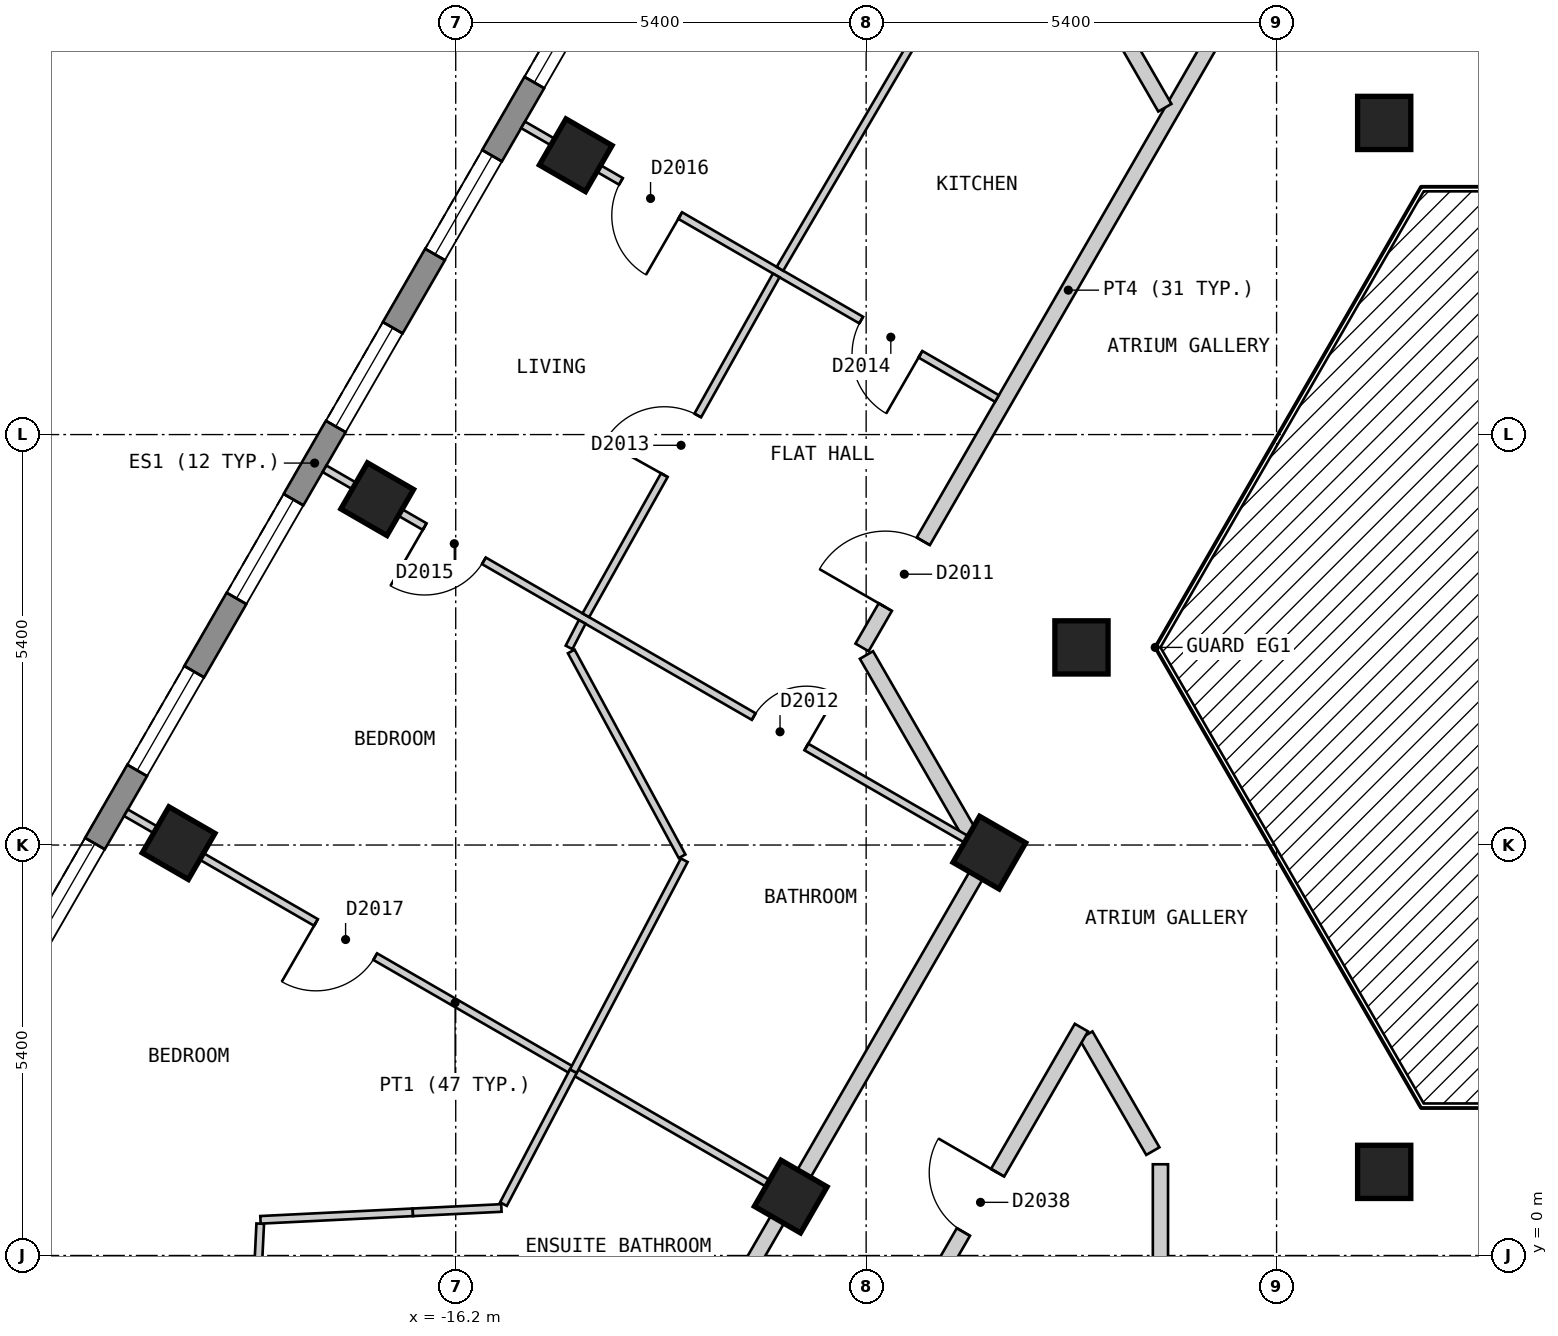
"""IFC4 building model, lengths in metres.
Left out: names, types, materials, properties, quantities, classifications, styles, units other than length and angle.
Written with IfcOpenShell. Run it as: python <this file> out.ifc"""

import sys

from ifc_helpers import new_model, si_unit, direction, frame, frame_2d, origin, origin_2d, place, context, subcontext, project, spatial, polyline, rectangle, outline, extrude, element, fill, save


model = new_model("IFC4")
c1 = context("Model", 3, precision=1e-05, world=origin(), true_north=direction((0.0, 1.0)))
c2 = subcontext(c1, "Body", "Model", "MODEL_VIEW")
j1 = project(units=[si_unit("LENGTHUNIT", "METRE"), si_unit("PLANEANGLEUNIT", "RADIAN")], contexts=[c1])
p1 = place(None, origin())
s1 = spatial("IfcSite", under=j1, at=p1, CompositionType="ELEMENT")
p2 = place(p1, origin())
s2 = spatial("IfcBuilding", under=s1, at=p2, CompositionType="ELEMENT")
p3 = place(p2, frame((0.0, 0.0, 238.8)))
s3 = spatial("IfcBuildingStorey", under=s2, at=p3, CompositionType="ELEMENT", Elevation=238.8)
for number, where, z_axis, x_axis in (
    (1, (-14.621, 14.475, 0.0), (0.0, 0.0, 1.0), (-0.5, -0.866, 0.0)),
    (2, (-17.233, 9.95, 0.0), (0.0, 0.0, 1.0), (-0.5, -0.866, 0.0)),
    (3, (-19.846, 5.425, 0.0), (0.0, 0.0, 1.0), (-0.5, -0.866, 0.0)),
    (4, (-3.984, 14.9, 0.0), (0.0, 0.0, 1.0), (1.0, 0.0, 0.0)),
    (5, (-7.967, 8.0, 0.0), (0.0, 0.0, 1.0), (1.0, 0.0, 0.0)),
    (6, (-9.179, 5.3, 0.0), (0.0, 0.0, 1.0), (-0.5, -0.866, 0.0)),
    (7, (-3.984, 1.1, 0.0), (0.0, 0.0, 1.0), (1.0, 0.0, 0.0)),
    (8, (-11.792, 0.775, 0.0), (0.0, 0.0, 1.0), (-0.5, -0.866, 0.0)),
):
    element("IfcColumn", number, at=place(p3, frame(where, z_axis=z_axis, x_axis=x_axis)), inside=s3, PredefinedType="COLUMN", context=c2, shape_type="SweptSolid", body=[
        extrude(rectangle(XDim=0.7, YDim=0.7, at=origin_2d()), origin(), (0.0, 0.0, 1.0), 3.0),
    ])
p4 = place(p3, frame((-12.514, 20.025, 0.0), z_axis=(0.0, 0.0, 1.0), x_axis=(-0.500003656944, -0.866023292436, 0.0)))
e9 = element("IfcWall", 9, at=p4, inside=s3, PredefinedType="SOLIDWALL", context=c2, shape_type="SweptSolid", body=[
    extrude(outline(polyline([(0.0, -0.15), (22.17, -0.15), (22.09, 0.15), (0.08, 0.15), (0.0, -0.15)])), origin(), (0.0, 0.0, 1.0), 2.7),
])
p5 = place(p4, frame((1.191, 0.0, 0.15)))
e10 = element("IfcOpeningElement", 10, at=p5, cuts=e9, PredefinedType="OPENING", context=c2, shape_type="SweptSolid", body=[
    extrude(rectangle(XDim=1.5, YDim=2.1, at=frame_2d((0.75, 1.05))), frame((0.0, 0.16, 0.0), z_axis=(0.0, -1.0, 0.0), x_axis=(1.0, 0.0, 0.0)), (0.0, 0.0, 1.0), 0.32),
])
p6 = place(p4, frame((3.804, 0.0, 0.15)))
e11 = element("IfcOpeningElement", 11, at=p6, cuts=e9, PredefinedType="OPENING", context=c2, shape_type="SweptSolid", body=[
    extrude(rectangle(XDim=1.5, YDim=2.1, at=frame_2d((0.75, 1.05))), frame((0.0, 0.16, 0.0), z_axis=(0.0, -1.0, 0.0), x_axis=(1.0, 0.0, 0.0)), (0.0, 0.0, 1.0), 0.32),
])
p7 = place(p4, frame((6.416, 0.0, 0.15)))
e12 = element("IfcOpeningElement", 12, at=p7, cuts=e9, PredefinedType="OPENING", context=c2, shape_type="SweptSolid", body=[
    extrude(rectangle(XDim=1.5, YDim=2.1, at=frame_2d((0.75, 1.05))), frame((0.0, 0.16, 0.0), z_axis=(0.0, -1.0, 0.0), x_axis=(1.0, 0.0, 0.0)), (0.0, 0.0, 1.0), 0.32),
])
p8 = place(p4, frame((9.029, 0.0, 0.15)))
e13 = element("IfcOpeningElement", 13, at=p8, cuts=e9, PredefinedType="OPENING", context=c2, shape_type="SweptSolid", body=[
    extrude(rectangle(XDim=1.5, YDim=2.1, at=frame_2d((0.75, 1.05))), frame((0.0, 0.16, 0.0), z_axis=(0.0, -1.0, 0.0), x_axis=(1.0, 0.0, 0.0)), (0.0, 0.0, 1.0), 0.32),
])
p9 = place(p4, frame((11.641, 0.0, 0.15)))
e14 = element("IfcOpeningElement", 14, at=p9, cuts=e9, PredefinedType="OPENING", context=c2, shape_type="SweptSolid", body=[
    extrude(rectangle(XDim=1.5, YDim=2.1, at=frame_2d((0.75, 1.05))), frame((0.0, 0.16, 0.0), z_axis=(0.0, -1.0, 0.0), x_axis=(1.0, 0.0, 0.0)), (0.0, 0.0, 1.0), 0.32),
])
p10 = place(p4, frame((14.254, 0.0, 0.15)))
e15 = element("IfcOpeningElement", 15, at=p10, cuts=e9, PredefinedType="OPENING", context=c2, shape_type="SweptSolid", body=[
    extrude(rectangle(XDim=1.5, YDim=2.1, at=frame_2d((0.75, 1.05))), frame((0.0, 0.16, 0.0), z_axis=(0.0, -1.0, 0.0), x_axis=(1.0, 0.0, 0.0)), (0.0, 0.0, 1.0), 0.32),
])
p11 = place(p4, frame((16.866, 0.0, 0.15)))
e16 = element("IfcOpeningElement", 16, at=p11, cuts=e9, PredefinedType="OPENING", context=c2, shape_type="SweptSolid", body=[
    extrude(rectangle(XDim=1.5, YDim=2.1, at=frame_2d((0.75, 1.05))), frame((0.0, 0.16, 0.0), z_axis=(0.0, -1.0, 0.0), x_axis=(1.0, 0.0, 0.0)), (0.0, 0.0, 1.0), 0.32),
])
p12 = place(p4, frame((19.479, 0.0, 0.15)))
e17 = element("IfcOpeningElement", 17, at=p12, cuts=e9, PredefinedType="OPENING", context=c2, shape_type="SweptSolid", body=[
    extrude(rectangle(XDim=1.5, YDim=2.1, at=frame_2d((0.75, 1.05))), frame((0.0, 0.16, 0.0), z_axis=(0.0, -1.0, 0.0), x_axis=(1.0, 0.0, 0.0)), (0.0, 0.0, 1.0), 0.32),
])
p13 = place(p3, frame((-10.796, 7.9, 0.0), z_axis=(0.0, 0.0, 1.0), x_axis=(0.499797758538, -0.866142136465, 0.0)))
e18 = element("IfcWall", 18, at=p13, inside=s3, PredefinedType="PARTITIONING", context=c2, shape_type="SweptSolid", body=[
    extrude(rectangle(XDim=2.713, YDim=0.2, at=frame_2d((1.356, 0.0))), origin(), (0.0, 0.0, 1.0), 2.7),
])
p14 = place(p3, frame((-7.909, 2.898, 0.0), z_axis=(0.0, 0.0, 1.0), x_axis=(0.50019444547, -0.865913111531, 0.0)))
e19 = element("IfcWall", 19, at=p14, inside=s3, PredefinedType="PARTITIONING", context=c2, shape_type="SweptSolid", body=[
    extrude(rectangle(XDim=1.761, YDim=0.2, at=frame_2d((0.88, 0.0))), origin(), (0.0, 0.0, 1.0), 2.7),
])
p15 = place(p3, frame((-10.623, -1.6, 0.0), z_axis=(0.0, 0.0, 1.0), x_axis=(0.500040865889, 0.866001808567, 0.0)))
e20 = element("IfcWall", 20, at=p15, inside=s3, PredefinedType="PARTITIONING", context=c2, shape_type="SweptSolid", body=[
    extrude(rectangle(XDim=5.31, YDim=0.2, at=frame_2d((2.655, 0.0))), origin(), (0.0, 0.0, 1.0), 2.7),
])
p16 = place(p15, frame((2.205, 0.0, 0.0)))
e21 = element("IfcOpeningElement", 21, at=p16, cuts=e20, PredefinedType="OPENING", context=c2, shape_type="SweptSolid", body=[
    extrude(rectangle(XDim=0.9, YDim=2.1, at=frame_2d((0.45, 1.05))), frame((0.0, 0.11, 0.0), z_axis=(0.0, -1.0, 0.0), x_axis=(1.0, 0.0, 0.0)), (0.0, 0.0, 1.0), 0.22),
])
p17 = place(p3, frame((-13.106, -1.5, 0.0), z_axis=(0.0, 0.0, 1.0), x_axis=(0.500025705601, 0.86601056214, 0.0)))
e22 = element("IfcWall", 22, at=p17, inside=s3, PredefinedType="PARTITIONING", context=c2, shape_type="SweptSolid", body=[
    extrude(rectangle(XDim=7.735, YDim=0.2, at=frame_2d((3.868, 0.0))), origin(), (0.0, 0.0, 1.0), 2.7),
])
p18 = place(p3, frame((-10.854, 8.0, 0.0), z_axis=(0.0, 0.0, 1.0), x_axis=(0.499997637144, 0.866026767976, 0.0)))
e23 = element("IfcWall", 23, at=p18, inside=s3, PredefinedType="PARTITIONING", context=c2, shape_type="SweptSolid", body=[
    extrude(rectangle(XDim=10.854, YDim=0.2, at=frame_2d((5.427, 0.0))), origin(), (0.0, 0.0, 1.0), 2.7),
])
p19 = place(p18, frame((0.612, 0.0, 0.0)))
e24 = element("IfcOpeningElement", 24, at=p19, cuts=e23, PredefinedType="OPENING", context=c2, shape_type="SweptSolid", body=[
    extrude(rectangle(XDim=1.0, YDim=2.1, at=frame_2d((0.5, 1.05))), frame((0.0, 0.11, 0.0), z_axis=(0.0, -1.0, 0.0), x_axis=(1.0, 0.0, 0.0)), (0.0, 0.0, 1.0), 0.22),
])
p20 = place(p3, frame((-6.928, -2.799, 0.0), z_axis=(0.0, 0.0, 1.0), x_axis=(0.0, 1.0, 0.0)))
e25 = element("IfcWall", 25, at=p20, inside=s3, PredefinedType="PARTITIONING", context=c2, shape_type="SweptSolid", body=[
    extrude(rectangle(XDim=3.999, YDim=0.2, at=frame_2d((2.0, 0.0))), origin(), (0.0, 0.0, 1.0), 2.7),
])
p21 = place(p3, frame((-14.68, 7.947, 0.0), z_axis=(0.0, 0.0, 1.0), x_axis=(0.475823637798, -0.879540712936, 0.0)))
e26 = element("IfcWall", 26, at=p21, inside=s3, PredefinedType="PARTITIONING", context=c2, shape_type="SweptSolid", body=[
    extrude(rectangle(XDim=3.064, YDim=0.1, at=frame_2d((1.532, 0.0))), origin(), (0.0, 0.0, 1.0), 2.7),
])
p22 = place(p3, frame((-20.539, 5.825, 0.0), z_axis=(0.0, 0.0, 1.0), x_axis=(0.866047370643, -0.499961950354, 0.0)))
e27 = element("IfcWall", 27, at=p22, inside=s3, PredefinedType="PARTITIONING", context=c2, shape_type="SweptSolid", body=[
    extrude(rectangle(XDim=10.001, YDim=0.1, at=frame_2d((5.0, 0.0))), origin(), (0.0, 0.0, 1.0), 2.7),
])
p23 = place(p22, frame((2.887, 0.0, 0.0)))
e28 = element("IfcOpeningElement", 28, at=p23, cuts=e27, PredefinedType="OPENING", context=c2, shape_type="SweptSolid", body=[
    extrude(rectangle(XDim=0.9, YDim=2.1, at=frame_2d((0.45, 1.05))), frame((0.0, 0.06, 0.0), z_axis=(0.0, -1.0, 0.0), x_axis=(1.0, 0.0, 0.0)), (0.0, 0.0, 1.0), 0.12),
])
p24 = place(p3, frame((-17.926, 10.35, 0.0), z_axis=(0.0, 0.0, 1.0), x_axis=(0.866018411306, -0.500012111133, 0.0)))
e29 = element("IfcWall", 29, at=p24, inside=s3, PredefinedType="PARTITIONING", context=c2, shape_type="SweptSolid", body=[
    extrude(rectangle(XDim=9.898, YDim=0.1, at=frame_2d((4.949, 0.0))), origin(), (0.0, 0.0, 1.0), 2.7),
])
p25 = place(p24, frame((6.52, 0.0, 0.0)))
e30 = element("IfcOpeningElement", 30, at=p25, cuts=e29, PredefinedType="OPENING", context=c2, shape_type="SweptSolid", body=[
    extrude(rectangle(XDim=0.8, YDim=2.1, at=frame_2d((0.4, 1.05))), frame((0.0, 0.06, 0.0), z_axis=(0.0, -1.0, 0.0), x_axis=(1.0, 0.0, 0.0)), (0.0, 0.0, 1.0), 0.12),
])
p26 = place(p24, frame((1.521, 0.0, 0.0)))
e31 = element("IfcOpeningElement", 31, at=p26, cuts=e29, PredefinedType="OPENING", context=c2, shape_type="SweptSolid", body=[
    extrude(rectangle(XDim=0.9, YDim=2.1, at=frame_2d((0.45, 1.05))), frame((0.0, 0.06, 0.0), z_axis=(0.0, -1.0, 0.0), x_axis=(1.0, 0.0, 0.0)), (0.0, 0.0, 1.0), 0.12),
])
p27 = place(p3, frame((-15.314, 14.875, 0.0), z_axis=(0.0, 0.0, 1.0), x_axis=(0.866001485781, -0.500041424909, 0.0)))
e32 = element("IfcWall", 32, at=p27, inside=s3, PredefinedType="PARTITIONING", context=c2, shape_type="SweptSolid", body=[
    extrude(rectangle(XDim=7.2, YDim=0.1, at=frame_2d((3.6, 0.0))), origin(), (0.0, 0.0, 1.0), 2.7),
])
p28 = place(p27, frame((5.137, 0.0, 0.0)))
e33 = element("IfcOpeningElement", 33, at=p28, cuts=e32, PredefinedType="OPENING", context=c2, shape_type="SweptSolid", body=[
    extrude(rectangle(XDim=0.9, YDim=2.1, at=frame_2d((0.45, 1.05))), frame((0.0, 0.06, 0.0), z_axis=(0.0, -1.0, 0.0), x_axis=(1.0, 0.0, 0.0)), (0.0, 0.0, 1.0), 0.12),
])
p29 = place(p27, frame((1.487, 0.0, 0.0)))
e34 = element("IfcOpeningElement", 34, at=p29, cuts=e32, PredefinedType="OPENING", context=c2, shape_type="SweptSolid", body=[
    extrude(rectangle(XDim=0.9, YDim=2.1, at=frame_2d((0.45, 1.05))), frame((0.0, 0.06, 0.0), z_axis=(0.0, -1.0, 0.0), x_axis=(1.0, 0.0, 0.0)), (0.0, 0.0, 1.0), 0.12),
])
p30 = place(p3, frame((-11.934, 12.981, 0.0), z_axis=(0.0, 0.0, 1.0), x_axis=(0.506072703404, 0.862490822484, 0.0)))
e35 = element("IfcWall", 35, at=p30, inside=s3, PredefinedType="PARTITIONING", context=c2, shape_type="SweptSolid", body=[
    extrude(rectangle(XDim=8.212, YDim=0.1, at=frame_2d((4.106, 0.0))), origin(), (0.0, 0.0, 1.0), 2.7),
])
p31 = place(p3, frame((-15.572, 0.676, 0.0), z_axis=(0.0, 0.0, 1.0), x_axis=(0.465298498919, 0.885153832339, 0.0)))
e36 = element("IfcWall", 36, at=p31, inside=s3, PredefinedType="PARTITIONING", context=c2, shape_type="SweptSolid", body=[
    extrude(rectangle(XDim=1.977, YDim=0.1, at=frame_2d((0.989, 0.0))), origin(), (0.0, 0.0, 1.0), 2.7),
])
p32 = place(p3, frame((-14.488, 8.423, 0.0), z_axis=(0.0, 0.0, 1.0), x_axis=(0.488810791055, 0.872389827169, 0.0)))
e37 = element("IfcWall", 37, at=p32, inside=s3, PredefinedType="PARTITIONING", context=c2, shape_type="SweptSolid", body=[
    extrude(rectangle(XDim=5.125, YDim=0.1, at=frame_2d((2.562, 0.0))), origin(), (0.0, 0.0, 1.0), 2.7),
])
p33 = place(p32, frame((2.113, 0.0, 0.0)))
e38 = element("IfcOpeningElement", 38, at=p33, cuts=e37, PredefinedType="OPENING", context=c2, shape_type="SweptSolid", body=[
    extrude(rectangle(XDim=0.9, YDim=2.1, at=frame_2d((0.45, 1.05))), frame((0.0, 0.06, 0.0), z_axis=(0.0, -1.0, 0.0), x_axis=(1.0, 0.0, 0.0)), (0.0, 0.0, 1.0), 0.12),
])
p34 = place(p3, frame((-14.709, 8.0, 0.0), z_axis=(0.0, 0.0, 1.0), x_axis=(0.459088195065, 0.888390696232, 0.0)))
e39 = element("IfcWall", 39, at=p34, inside=s3, PredefinedType="PARTITIONING", context=c2, shape_type="SweptSolid", body=[
    extrude(rectangle(XDim=0.377, YDim=0.1, at=frame_2d((0.188, 0.0))), origin(), (0.0, 0.0, 1.0), 2.7),
])
p35 = place(p3, frame((-18.866, -1.5, 0.0), z_axis=(0.0, 0.0, 1.0), x_axis=(0.048923533446, 0.998802526967, 0.0)))
e40 = element("IfcWall", 40, at=p35, inside=s3, PredefinedType="PARTITIONING", context=c2, shape_type="SweptSolid", body=[
    extrude(rectangle(XDim=1.921, YDim=0.1, at=frame_2d((0.96, 0.0))), origin(), (0.0, 0.0, 1.0), 2.7),
])
p36 = place(p35, frame((0.536, 0.0, 0.0)))
e41 = element("IfcOpeningElement", 41, at=p36, cuts=e40, PredefinedType="OPENING", context=c2, shape_type="SweptSolid", body=[
    extrude(rectangle(XDim=0.8, YDim=2.1, at=frame_2d((0.4, 1.05))), frame((0.0, 0.06, 0.0), z_axis=(0.0, -1.0, 0.0), x_axis=(1.0, 0.0, 0.0)), (0.0, 0.0, 1.0), 0.12),
])
p37 = place(p3, frame((-18.769, 0.469, 0.0), z_axis=(0.0, 0.0, 1.0), x_axis=(0.998780383332, 0.049373534108, 0.0)))
e42 = element("IfcWall", 42, at=p37, inside=s3, PredefinedType="PARTITIONING", context=c2, shape_type="SweptSolid", body=[
    extrude(rectangle(XDim=2.008, YDim=0.1, at=frame_2d((1.004, 0.0))), origin(), (0.0, 0.0, 1.0), 2.7),
])
p38 = place(p3, frame((-16.764, 0.568, 0.0), z_axis=(0.0, 0.0, 1.0), x_axis=(0.998809616198, 0.048778587419, 0.0)))
e43 = element("IfcWall", 43, at=p38, inside=s3, PredefinedType="PARTITIONING", context=c2, shape_type="SweptSolid", body=[
    extrude(rectangle(XDim=1.166, YDim=0.1, at=frame_2d((0.583, 0.0))), origin(), (0.0, 0.0, 1.0), 2.7),
])
p39 = place(p3, frame((-7.578, 16.325, 0.0), z_axis=(0.0, 0.0, 1.0), x_axis=(0.500314976313, -0.865843475737, 0.0)))
e44 = element("IfcWall", 44, at=p39, inside=s3, PredefinedType="PARTITIONING", context=c2, shape_type="SweptSolid", body=[
    extrude(rectangle(XDim=1.415, YDim=0.2, at=frame_2d((0.707, 0.0))), origin(), (0.0, 0.0, 1.0), 2.7),
])
p40 = place(p3, frame((-14.652, 2.426, 0.0), z_axis=(0.0, 0.0, 1.0), x_axis=(0.465502421984, 0.885046606189, 0.0)))
e45 = element("IfcWall", 45, at=p40, inside=s3, PredefinedType="PARTITIONING", context=c2, shape_type="SweptSolid", body=[
    extrude(rectangle(XDim=3.134, YDim=0.1, at=frame_2d((1.567, 0.0))), origin(), (0.0, 0.0, 1.0), 2.7),
])
p41 = place(p6, origin())
e46 = element("IfcWindow", 46, at=p41, inside=s3, PartitioningType="SINGLE_PANEL", PredefinedType="WINDOW", context=c2, shape_type="SweptSolid", body=[
    extrude(rectangle(XDim=1.5, YDim=2.1, at=frame_2d((0.75, 1.05))), frame((0.0, 0.03, 0.0), z_axis=(0.0, -1.0, 0.0), x_axis=(1.0, 0.0, 0.0)), (0.0, 0.0, 1.0), 0.06),
])
fill(e11, e46)
p42 = place(p7, origin())
e47 = element("IfcWindow", 47, at=p42, inside=s3, PartitioningType="SINGLE_PANEL", PredefinedType="WINDOW", context=c2, shape_type="SweptSolid", body=[
    extrude(rectangle(XDim=1.5, YDim=2.1, at=frame_2d((0.75, 1.05))), frame((0.0, 0.03, 0.0), z_axis=(0.0, -1.0, 0.0), x_axis=(1.0, 0.0, 0.0)), (0.0, 0.0, 1.0), 0.06),
])
fill(e12, e47)
p43 = place(p8, origin())
e48 = element("IfcWindow", 48, at=p43, inside=s3, PartitioningType="SINGLE_PANEL", PredefinedType="WINDOW", context=c2, shape_type="SweptSolid", body=[
    extrude(rectangle(XDim=1.5, YDim=2.1, at=frame_2d((0.75, 1.05))), frame((0.0, 0.03, 0.0), z_axis=(0.0, -1.0, 0.0), x_axis=(1.0, 0.0, 0.0)), (0.0, 0.0, 1.0), 0.06),
])
fill(e13, e48)
p44 = place(p9, origin())
e49 = element("IfcWindow", 49, at=p44, inside=s3, PartitioningType="SINGLE_PANEL", PredefinedType="WINDOW", context=c2, shape_type="SweptSolid", body=[
    extrude(rectangle(XDim=1.5, YDim=2.1, at=frame_2d((0.75, 1.05))), frame((0.0, 0.03, 0.0), z_axis=(0.0, -1.0, 0.0), x_axis=(1.0, 0.0, 0.0)), (0.0, 0.0, 1.0), 0.06),
])
fill(e14, e49)
p45 = place(p10, origin())
e50 = element("IfcWindow", 50, at=p45, inside=s3, PartitioningType="SINGLE_PANEL", PredefinedType="WINDOW", context=c2, shape_type="SweptSolid", body=[
    extrude(rectangle(XDim=1.5, YDim=2.1, at=frame_2d((0.75, 1.05))), frame((0.0, 0.03, 0.0), z_axis=(0.0, -1.0, 0.0), x_axis=(1.0, 0.0, 0.0)), (0.0, 0.0, 1.0), 0.06),
])
fill(e15, e50)
p46 = place(p11, origin())
e51 = element("IfcWindow", 51, at=p46, inside=s3, PartitioningType="SINGLE_PANEL", PredefinedType="WINDOW", context=c2, shape_type="SweptSolid", body=[
    extrude(rectangle(XDim=1.5, YDim=2.1, at=frame_2d((0.75, 1.05))), frame((0.0, 0.03, 0.0), z_axis=(0.0, -1.0, 0.0), x_axis=(1.0, 0.0, 0.0)), (0.0, 0.0, 1.0), 0.06),
])
fill(e16, e51)
p47 = place(p19, origin())
e52 = element("IfcDoor", 52, at=p47, inside=s3, OperationType="SINGLE_SWING_LEFT", PredefinedType="DOOR", context=c2, shape_type="SweptSolid", body=[
    extrude(rectangle(XDim=1.0, YDim=2.1, at=frame_2d((0.5, 1.05))), frame((0.0, 0.025, 0.0), z_axis=(0.0, -1.0, 0.0), x_axis=(1.0, 0.0, 0.0)), (0.0, 0.0, 1.0), 0.05),
])
fill(e24, e52)
p48 = place(p25, origin())
e53 = element("IfcDoor", 53, at=p48, inside=s3, OperationType="SINGLE_SWING_RIGHT", PredefinedType="DOOR", context=c2, shape_type="SweptSolid", body=[
    extrude(rectangle(XDim=0.8, YDim=2.1, at=frame_2d((0.4, 1.05))), frame((0.0, 0.025, 0.0), z_axis=(0.0, -1.0, 0.0), x_axis=(1.0, 0.0, 0.0)), (0.0, 0.0, 1.0), 0.05),
])
fill(e30, e53)
p49 = place(p33, origin())
e54 = element("IfcDoor", 54, at=p49, inside=s3, OperationType="SINGLE_SWING_LEFT", PredefinedType="DOOR", context=c2, shape_type="SweptSolid", body=[
    extrude(rectangle(XDim=0.9, YDim=2.1, at=frame_2d((0.45, 1.05))), frame((0.0, 0.025, 0.0), z_axis=(0.0, -1.0, 0.0), x_axis=(1.0, 0.0, 0.0)), (0.0, 0.0, 1.0), 0.05),
])
fill(e38, e54)
p50 = place(p28, origin())
e55 = element("IfcDoor", 55, at=p50, inside=s3, OperationType="SINGLE_SWING_RIGHT", PredefinedType="DOOR", context=c2, shape_type="SweptSolid", body=[
    extrude(rectangle(XDim=0.9, YDim=2.1, at=frame_2d((0.45, 1.05))), frame((0.0, 0.025, 0.0), z_axis=(0.0, -1.0, 0.0), x_axis=(1.0, 0.0, 0.0)), (0.0, 0.0, 1.0), 0.05),
])
fill(e33, e55)
p51 = place(p26, origin())
e56 = element("IfcDoor", 56, at=p51, inside=s3, OperationType="SINGLE_SWING_LEFT", PredefinedType="DOOR", context=c2, shape_type="SweptSolid", body=[
    extrude(rectangle(XDim=0.9, YDim=2.1, at=frame_2d((0.45, 1.05))), frame((0.0, 0.025, 0.0), z_axis=(0.0, -1.0, 0.0), x_axis=(1.0, 0.0, 0.0)), (0.0, 0.0, 1.0), 0.05),
])
fill(e31, e56)
p52 = place(p29, origin())
e57 = element("IfcDoor", 57, at=p52, inside=s3, OperationType="SINGLE_SWING_RIGHT", PredefinedType="DOOR", context=c2, shape_type="SweptSolid", body=[
    extrude(rectangle(XDim=0.9, YDim=2.1, at=frame_2d((0.45, 1.05))), frame((0.0, 0.025, 0.0), z_axis=(0.0, -1.0, 0.0), x_axis=(1.0, 0.0, 0.0)), (0.0, 0.0, 1.0), 0.05),
])
fill(e34, e57)
p53 = place(p23, origin())
e58 = element("IfcDoor", 58, at=p53, inside=s3, OperationType="SINGLE_SWING_LEFT", PredefinedType="DOOR", context=c2, shape_type="SweptSolid", body=[
    extrude(rectangle(XDim=0.9, YDim=2.1, at=frame_2d((0.45, 1.05))), frame((0.0, 0.025, 0.0), z_axis=(0.0, -1.0, 0.0), x_axis=(1.0, 0.0, 0.0)), (0.0, 0.0, 1.0), 0.05),
])
fill(e28, e58)
p54 = place(p16, origin())
e59 = element("IfcDoor", 59, at=p54, inside=s3, OperationType="SINGLE_SWING_RIGHT", PredefinedType="DOOR", context=c2, shape_type="SweptSolid", body=[
    extrude(rectangle(XDim=0.9, YDim=2.1, at=frame_2d((0.45, 1.05))), frame((0.0, 0.025, 0.0), z_axis=(0.0, -1.0, 0.0), x_axis=(1.0, 0.0, 0.0)), (0.0, 0.0, 1.0), 0.05),
])
fill(e21, e59)
save(model, sys.argv[1])
